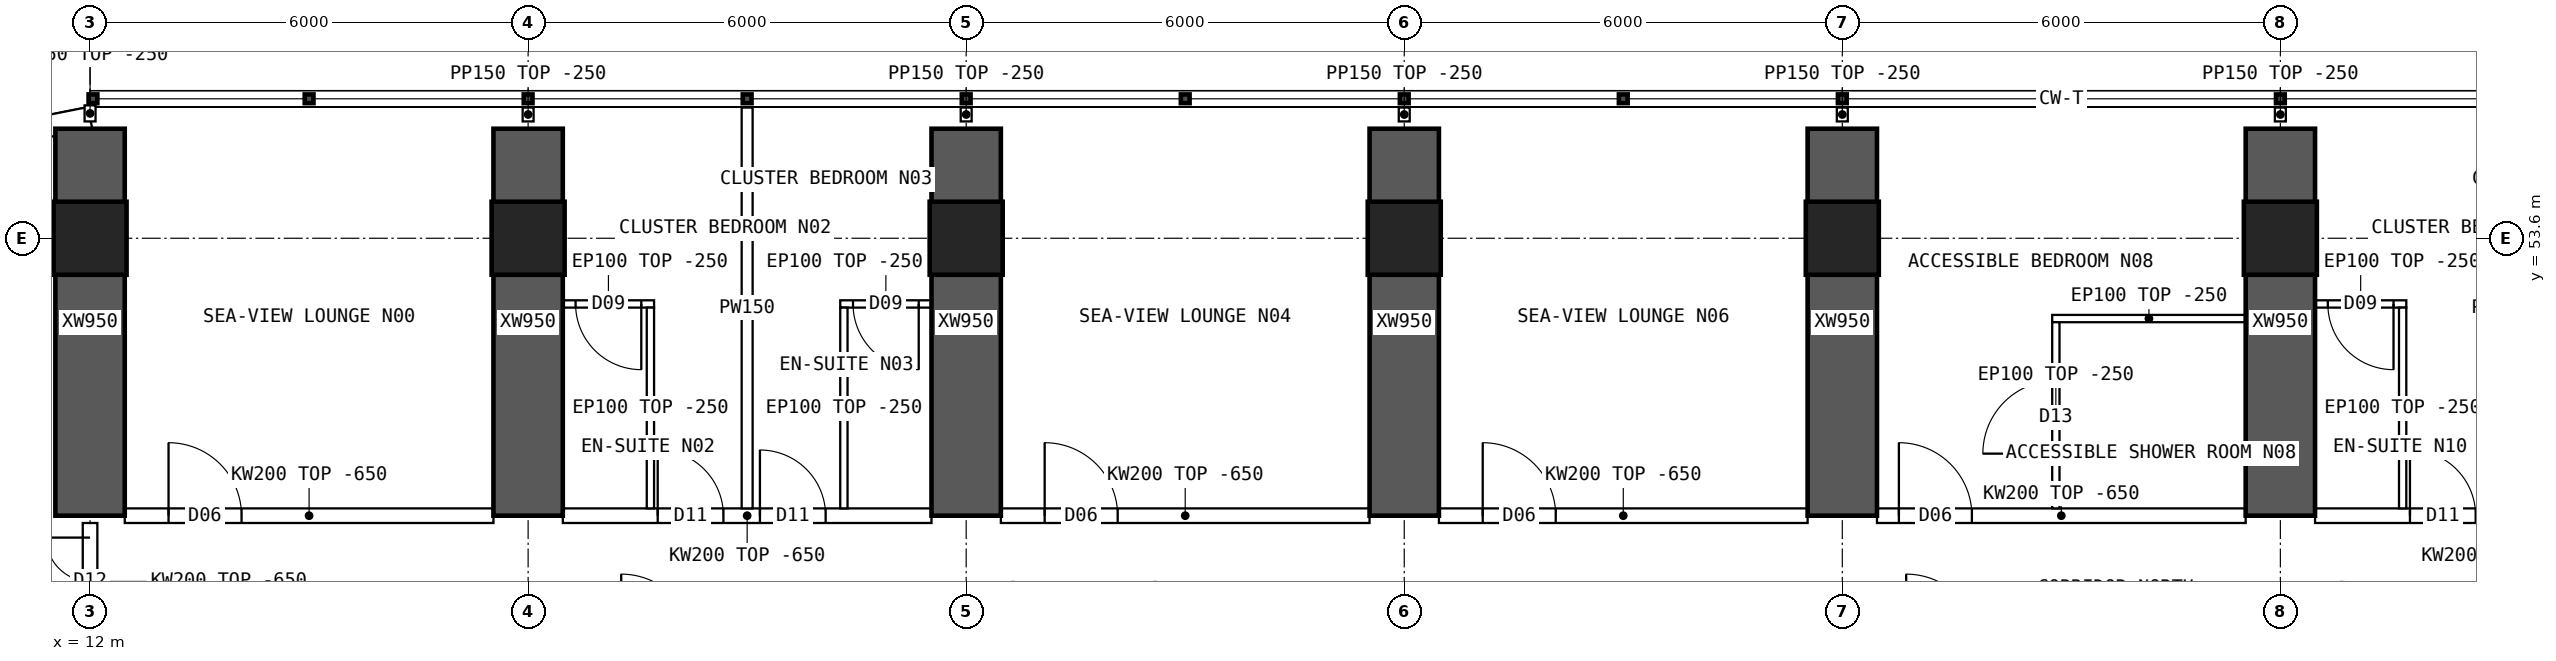
"""IFC4 building model, lengths in metres.
Left out: names, types, materials, properties, quantities, classifications, styles, units other than length and angle.
Written with IfcOpenShell. Run it as: python <this file> out.ifc"""

import sys

from ifc_helpers import new_model, si_unit, direction, frame, frame_2d, origin, origin_2d, place, context, subcontext, project, spatial, polyline, rectangle, hollow_rectangle, outline, extrude, element, fill, save


model = new_model("IFC4")
c1 = context("Model", 3, precision=1e-05, world=origin(), true_north=direction((0.0, 1.0)))
c2 = subcontext(c1, "Body", "Model", "MODEL_VIEW")
j1 = project(units=[si_unit("LENGTHUNIT", "METRE"), si_unit("PLANEANGLEUNIT", "RADIAN")], contexts=[c1])
p1 = place(None, origin())
s1 = spatial("IfcSite", under=j1, at=p1, CompositionType="ELEMENT")
p2 = place(p1, origin())
s2 = spatial("IfcBuilding", under=s1, at=p2, CompositionType="ELEMENT")
p3 = place(p2, frame((0.0, 0.0, 103.15)))
s3 = spatial("IfcBuildingStorey", under=s2, at=p3, CompositionType="ELEMENT", Elevation=103.15)
for number, where, z_axis, x_axis in (
    (1, (12.0, 53.6, 0.0), (0.0, 0.0, 1.0), (1.0, 0.0, 0.0)),
    (2, (18.0, 53.6, 0.0), (0.0, 0.0, 1.0), (1.0, 0.0, 0.0)),
    (3, (24.0, 53.6, 0.0), (0.0, 0.0, 1.0), (1.0, 0.0, 0.0)),
    (4, (30.0, 53.6, 0.0), (0.0, 0.0, 1.0), (1.0, 0.0, 0.0)),
    (5, (36.0, 53.6, 0.0), (0.0, 0.0, 1.0), (1.0, 0.0, 0.0)),
    (6, (42.0, 53.6, 0.0), (0.0, 0.0, 1.0), (1.0, 0.0, 0.0)),
):
    element("IfcColumn", number, at=place(p3, frame(where, z_axis=z_axis, x_axis=x_axis)), inside=s3, PredefinedType="COLUMN", context=c2, shape_type="SweptSolid", body=[
        extrude(hollow_rectangle(XDim=1.0, YDim=1.0, WallThickness=0.1, at=origin_2d()), origin(), (0.0, 0.0, 1.0), 3.75),
    ])
for number, where, z_axis, x_axis in (
    (7, (12.0, 49.8, 0.0), (0.0, 0.0, 1.0), (0.0, 1.0, 0.0)),
    (8, (18.0, 49.8, 0.0), (0.0, 0.0, 1.0), (0.0, 1.0, 0.0)),
    (9, (24.0, 49.8, 0.0), (0.0, 0.0, 1.0), (0.0, 1.0, 0.0)),
    (10, (30.0, 49.8, 0.0), (0.0, 0.0, 1.0), (0.0, 1.0, 0.0)),
    (11, (36.0, 49.8, 0.0), (0.0, 0.0, 1.0), (0.0, 1.0, 0.0)),
    (12, (42.0, 49.8, 0.0), (0.0, 0.0, 1.0), (0.0, 1.0, 0.0)),
):
    element("IfcWall", number, at=place(p3, frame(where, z_axis=z_axis, x_axis=x_axis)), inside=s3, PredefinedType="SHEAR", context=c2, shape_type="SweptSolid", body=[
        extrude(rectangle(XDim=5.3, YDim=0.95, at=frame_2d((2.65, 0.0))), origin(), (0.0, 0.0, 1.0), 3.75),
    ])
p4 = place(p3, frame((12.0, 55.25, 0.0), z_axis=(0.0, 0.0, 1.0), x_axis=(-0.980787251524, -0.195080412259, 0.0)))
e13 = element("IfcWall", 13, at=p4, inside=s3, PredefinedType="SOLIDWALL", context=c2, shape_type="SweptSolid", body=[
    extrude(outline(polyline([(-0.03, -0.15), (3.249, -0.15), (3.189, 0.15), (0.03, 0.15), (-0.03, -0.15)])), origin(), (0.0, 0.0, 1.0), 3.5),
])
p5 = place(p4, frame((0.909, 0.0, 0.9)))
e14 = element("IfcOpeningElement", 14, at=p5, cuts=e13, PredefinedType="OPENING", context=c2, shape_type="SweptSolid", body=[
    extrude(rectangle(XDim=1.4, YDim=1.8, at=frame_2d((0.7, 0.9))), frame((0.0, 0.16, 0.0), z_axis=(0.0, -1.0, 0.0), x_axis=(1.0, 0.0, 0.0)), (0.0, 0.0, 1.0), 0.32),
])
p6 = place(p3, frame((12.475, 49.8, 0.0), z_axis=(0.0, 0.0, 1.0), x_axis=(1.0, 0.0, 0.0)))
e15 = element("IfcWall", 15, at=p6, inside=s3, PredefinedType="SOLIDWALL", context=c2, shape_type="SweptSolid", body=[
    extrude(outline(polyline([(0.0, 0.0), (5.05, 0.0), (5.05, 3.1), (0.0, 3.1), (0.0, 0.0)])), frame((0.0, 0.1, 0.0), z_axis=(0.0, -1.0, 0.0), x_axis=(1.0, 0.0, 0.0)), (0.0, 0.0, 1.0), 0.2),
])
p7 = place(p6, frame((0.6, 0.0, 0.0)))
e16 = element("IfcOpeningElement", 16, at=p7, cuts=e15, PredefinedType="OPENING", context=c2, shape_type="SweptSolid", body=[
    extrude(rectangle(XDim=1.0, YDim=2.1, at=frame_2d((0.5, 1.05))), frame((0.0, 0.11, 0.0), z_axis=(0.0, -1.0, 0.0), x_axis=(1.0, 0.0, 0.0)), (0.0, 0.0, 1.0), 0.22),
])
p8 = place(p3, frame((18.475, 49.8, 0.0), z_axis=(0.0, 0.0, 1.0), x_axis=(1.0, 0.0, 0.0)))
e17 = element("IfcWall", 17, at=p8, inside=s3, PredefinedType="SOLIDWALL", context=c2, shape_type="SweptSolid", body=[
    extrude(outline(polyline([(0.0, 0.0), (5.05, 0.0), (5.05, 3.1), (0.0, 3.1), (0.0, 0.0)])), frame((0.0, 0.1, 0.0), z_axis=(0.0, -1.0, 0.0), x_axis=(1.0, 0.0, 0.0)), (0.0, 0.0, 1.0), 0.2),
])
p9 = place(p8, frame((1.3, 0.0, 0.0)))
e18 = element("IfcOpeningElement", 18, at=p9, cuts=e17, PredefinedType="OPENING", context=c2, shape_type="SweptSolid", body=[
    extrude(rectangle(XDim=0.9, YDim=2.1, at=frame_2d((0.45, 1.05))), frame((0.0, 0.11, 0.0), z_axis=(0.0, -1.0, 0.0), x_axis=(1.0, 0.0, 0.0)), (0.0, 0.0, 1.0), 0.22),
])
p10 = place(p8, frame((2.7, 0.0, 0.0)))
e19 = element("IfcOpeningElement", 19, at=p10, cuts=e17, PredefinedType="OPENING", context=c2, shape_type="SweptSolid", body=[
    extrude(rectangle(XDim=0.9, YDim=2.1, at=frame_2d((0.45, 1.05))), frame((0.0, 0.11, 0.0), z_axis=(0.0, -1.0, 0.0), x_axis=(1.0, 0.0, 0.0)), (0.0, 0.0, 1.0), 0.22),
])
p11 = place(p3, frame((24.475, 49.8, 0.0), z_axis=(0.0, 0.0, 1.0), x_axis=(1.0, 0.0, 0.0)))
e20 = element("IfcWall", 20, at=p11, inside=s3, PredefinedType="SOLIDWALL", context=c2, shape_type="SweptSolid", body=[
    extrude(outline(polyline([(0.0, 0.0), (5.05, 0.0), (5.05, 3.1), (0.0, 3.1), (0.0, 0.0)])), frame((0.0, 0.1, 0.0), z_axis=(0.0, -1.0, 0.0), x_axis=(1.0, 0.0, 0.0)), (0.0, 0.0, 1.0), 0.2),
])
p12 = place(p11, frame((0.6, 0.0, 0.0)))
e21 = element("IfcOpeningElement", 21, at=p12, cuts=e20, PredefinedType="OPENING", context=c2, shape_type="SweptSolid", body=[
    extrude(rectangle(XDim=1.0, YDim=2.1, at=frame_2d((0.5, 1.05))), frame((0.0, 0.11, 0.0), z_axis=(0.0, -1.0, 0.0), x_axis=(1.0, 0.0, 0.0)), (0.0, 0.0, 1.0), 0.22),
])
p13 = place(p3, frame((30.475, 49.8, 0.0), z_axis=(0.0, 0.0, 1.0), x_axis=(1.0, 0.0, 0.0)))
e22 = element("IfcWall", 22, at=p13, inside=s3, PredefinedType="SOLIDWALL", context=c2, shape_type="SweptSolid", body=[
    extrude(outline(polyline([(0.0, 0.0), (5.05, 0.0), (5.05, 3.1), (0.0, 3.1), (0.0, 0.0)])), frame((0.0, 0.1, 0.0), z_axis=(0.0, -1.0, 0.0), x_axis=(1.0, 0.0, 0.0)), (0.0, 0.0, 1.0), 0.2),
])
p14 = place(p13, frame((0.6, 0.0, 0.0)))
e23 = element("IfcOpeningElement", 23, at=p14, cuts=e22, PredefinedType="OPENING", context=c2, shape_type="SweptSolid", body=[
    extrude(rectangle(XDim=1.0, YDim=2.1, at=frame_2d((0.5, 1.05))), frame((0.0, 0.11, 0.0), z_axis=(0.0, -1.0, 0.0), x_axis=(1.0, 0.0, 0.0)), (0.0, 0.0, 1.0), 0.22),
])
p15 = place(p3, frame((36.475, 49.8, 0.0), z_axis=(0.0, 0.0, 1.0), x_axis=(1.0, 0.0, 0.0)))
e24 = element("IfcWall", 24, at=p15, inside=s3, PredefinedType="SOLIDWALL", context=c2, shape_type="SweptSolid", body=[
    extrude(outline(polyline([(0.0, 0.0), (5.05, 0.0), (5.05, 3.1), (0.0, 3.1), (0.0, 0.0)])), frame((0.0, 0.1, 0.0), z_axis=(0.0, -1.0, 0.0), x_axis=(1.0, 0.0, 0.0)), (0.0, 0.0, 1.0), 0.2),
])
p16 = place(p15, frame((0.3, 0.0, 0.0)))
e25 = element("IfcOpeningElement", 25, at=p16, cuts=e24, PredefinedType="OPENING", context=c2, shape_type="SweptSolid", body=[
    extrude(rectangle(XDim=1.0, YDim=2.1, at=frame_2d((0.5, 1.05))), frame((0.0, 0.11, 0.0), z_axis=(0.0, -1.0, 0.0), x_axis=(1.0, 0.0, 0.0)), (0.0, 0.0, 1.0), 0.22),
])
p17 = place(p3, frame((42.475, 49.8, 0.0), z_axis=(0.0, 0.0, 1.0), x_axis=(1.0, 0.0, 0.0)))
e26 = element("IfcWall", 26, at=p17, inside=s3, PredefinedType="SOLIDWALL", context=c2, shape_type="SweptSolid", body=[
    extrude(outline(polyline([(0.0, 0.0), (5.05, 0.0), (5.05, 3.1), (0.0, 3.1), (0.0, 0.0)])), frame((0.0, 0.1, 0.0), z_axis=(0.0, -1.0, 0.0), x_axis=(1.0, 0.0, 0.0)), (0.0, 0.0, 1.0), 0.2),
])
p18 = place(p17, frame((1.3, 0.0, 0.0)))
e27 = element("IfcOpeningElement", 27, at=p18, cuts=e26, PredefinedType="OPENING", context=c2, shape_type="SweptSolid", body=[
    extrude(rectangle(XDim=0.9, YDim=2.1, at=frame_2d((0.45, 1.05))), frame((0.0, 0.11, 0.0), z_axis=(0.0, -1.0, 0.0), x_axis=(1.0, 0.0, 0.0)), (0.0, 0.0, 1.0), 0.22),
])
p19 = place(p17, frame((2.7, 0.0, 0.0)))
e28 = element("IfcOpeningElement", 28, at=p19, cuts=e26, PredefinedType="OPENING", context=c2, shape_type="SweptSolid", body=[
    extrude(rectangle(XDim=0.9, YDim=2.1, at=frame_2d((0.45, 1.05))), frame((0.0, 0.11, 0.0), z_axis=(0.0, -1.0, 0.0), x_axis=(1.0, 0.0, 0.0)), (0.0, 0.0, 1.0), 0.22),
])
p20 = place(p3, frame((21.0, 55.39, 0.0), z_axis=(0.0, 0.0, 1.0), x_axis=(0.0, -1.0, 0.0)))
e29 = element("IfcWall", 29, at=p20, inside=s3, PredefinedType="PARTITIONING", context=c2, shape_type="SweptSolid", body=[
    extrude(outline(polyline([(0.0, 0.0), (5.49, 0.0), (5.49, 3.1), (5.442, 3.1), (5.44, 3.5), (1.992, 3.5), (1.99, 3.1), (1.592, 3.1), (1.59, 3.5), (0.0, 3.5), (0.0, 0.0)])), frame((0.0, 0.075, 0.0), z_axis=(0.0, -1.0, 0.0), x_axis=(1.0, 0.0, 0.0)), (0.0, 0.0, 1.0), 0.15),
])
p21 = place(p3, frame((18.475, 52.7, 0.0), z_axis=(0.0, 0.0, 1.0), x_axis=(1.0, 0.0, 0.0)))
e30 = element("IfcWall", 30, at=p21, inside=s3, PredefinedType="PARTITIONING", context=c2, shape_type="SweptSolid", body=[
    extrude(rectangle(XDim=1.25, YDim=0.1, at=frame_2d((0.625, 0.0))), origin(), (0.0, 0.0, 1.0), 3.5),
])
p22 = place(p21, frame((0.175, 0.0, 0.0)))
e31 = element("IfcOpeningElement", 31, at=p22, cuts=e30, PredefinedType="OPENING", context=c2, shape_type="SweptSolid", body=[
    extrude(rectangle(XDim=0.9, YDim=2.1, at=frame_2d((0.45, 1.05))), frame((0.0, 0.06, 0.0), z_axis=(0.0, -1.0, 0.0), x_axis=(1.0, 0.0, 0.0)), (0.0, 0.0, 1.0), 0.12),
])
p23 = place(p3, frame((19.675, 52.65, 0.0), z_axis=(0.0, 0.0, 1.0), x_axis=(0.0, -1.0, 0.0)))
e32 = element("IfcWall", 32, at=p23, inside=s3, PredefinedType="PARTITIONING", context=c2, shape_type="SweptSolid", body=[
    extrude(outline(polyline([(0.0, 0.0), (2.75, 0.0), (2.75, 3.1), (2.702, 3.1), (2.7, 3.5), (0.0, 3.5), (0.0, 0.0)])), frame((0.0, 0.05, 0.0), z_axis=(0.0, -1.0, 0.0), x_axis=(1.0, 0.0, 0.0)), (0.0, 0.0, 1.0), 0.1),
])
p24 = place(p3, frame((22.275, 52.7, 0.0), z_axis=(0.0, 0.0, 1.0), x_axis=(1.0, 0.0, 0.0)))
e33 = element("IfcWall", 33, at=p24, inside=s3, PredefinedType="PARTITIONING", context=c2, shape_type="SweptSolid", body=[
    extrude(rectangle(XDim=1.25, YDim=0.1, at=frame_2d((0.625, 0.0))), origin(), (0.0, 0.0, 1.0), 3.5),
])
p25 = place(p24, frame((0.175, 0.0, 0.0)))
e34 = element("IfcOpeningElement", 34, at=p25, cuts=e33, PredefinedType="OPENING", context=c2, shape_type="SweptSolid", body=[
    extrude(rectangle(XDim=0.9, YDim=2.1, at=frame_2d((0.45, 1.05))), frame((0.0, 0.06, 0.0), z_axis=(0.0, -1.0, 0.0), x_axis=(1.0, 0.0, 0.0)), (0.0, 0.0, 1.0), 0.12),
])
p26 = place(p3, frame((22.325, 52.65, 0.0), z_axis=(0.0, 0.0, 1.0), x_axis=(0.0, -1.0, 0.0)))
e35 = element("IfcWall", 35, at=p26, inside=s3, PredefinedType="PARTITIONING", context=c2, shape_type="SweptSolid", body=[
    extrude(outline(polyline([(0.0, 0.0), (2.75, 0.0), (2.75, 3.1), (2.702, 3.1), (2.7, 3.5), (0.0, 3.5), (0.0, 0.0)])), frame((0.0, 0.05, 0.0), z_axis=(0.0, -1.0, 0.0), x_axis=(1.0, 0.0, 0.0)), (0.0, 0.0, 1.0), 0.1),
])
p27 = place(p3, frame((38.875, 52.5, 0.0), z_axis=(0.0, 0.0, 1.0), x_axis=(1.0, 0.0, 0.0)))
e36 = element("IfcWall", 36, at=p27, inside=s3, PredefinedType="PARTITIONING", context=c2, shape_type="SweptSolid", body=[
    extrude(rectangle(XDim=2.65, YDim=0.1, at=frame_2d((1.325, 0.0))), origin(), (0.0, 0.0, 1.0), 3.5),
])
p28 = place(p3, frame((38.925, 52.45, 0.0), z_axis=(0.0, 0.0, 1.0), x_axis=(0.0, -1.0, 0.0)))
e37 = element("IfcWall", 37, at=p28, inside=s3, PredefinedType="PARTITIONING", context=c2, shape_type="SweptSolid", body=[
    extrude(outline(polyline([(0.0, 0.0), (2.55, 0.0), (2.55, 3.1), (2.502, 3.1), (2.5, 3.5), (0.0, 3.5), (0.0, 0.0)])), frame((0.0, 0.05, 0.0), z_axis=(0.0, -1.0, 0.0), x_axis=(1.0, 0.0, 0.0)), (0.0, 0.0, 1.0), 0.1),
])
p29 = place(p28, frame((0.8, 0.0, 0.0)))
e38 = element("IfcOpeningElement", 38, at=p29, cuts=e37, PredefinedType="OPENING", context=c2, shape_type="SweptSolid", body=[
    extrude(rectangle(XDim=1.0, YDim=2.1, at=frame_2d((0.5, 1.05))), frame((0.0, 0.06, 0.0), z_axis=(0.0, -1.0, 0.0), x_axis=(1.0, 0.0, 0.0)), (0.0, 0.0, 1.0), 0.12),
])
p30 = place(p3, frame((42.475, 52.7, 0.0), z_axis=(0.0, 0.0, 1.0), x_axis=(1.0, 0.0, 0.0)))
e39 = element("IfcWall", 39, at=p30, inside=s3, PredefinedType="PARTITIONING", context=c2, shape_type="SweptSolid", body=[
    extrude(rectangle(XDim=1.25, YDim=0.1, at=frame_2d((0.625, 0.0))), origin(), (0.0, 0.0, 1.0), 3.5),
])
p31 = place(p30, frame((0.175, 0.0, 0.0)))
e40 = element("IfcOpeningElement", 40, at=p31, cuts=e39, PredefinedType="OPENING", context=c2, shape_type="SweptSolid", body=[
    extrude(rectangle(XDim=0.9, YDim=2.1, at=frame_2d((0.45, 1.05))), frame((0.0, 0.06, 0.0), z_axis=(0.0, -1.0, 0.0), x_axis=(1.0, 0.0, 0.0)), (0.0, 0.0, 1.0), 0.12),
])
p32 = place(p3, frame((43.675, 52.65, 0.0), z_axis=(0.0, 0.0, 1.0), x_axis=(0.0, -1.0, 0.0)))
e41 = element("IfcWall", 41, at=p32, inside=s3, PredefinedType="PARTITIONING", context=c2, shape_type="SweptSolid", body=[
    extrude(outline(polyline([(0.0, 0.0), (2.75, 0.0), (2.75, 3.1), (2.702, 3.1), (2.7, 3.5), (0.0, 3.5), (0.0, 0.0)])), frame((0.0, 0.05, 0.0), z_axis=(0.0, -1.0, 0.0), x_axis=(1.0, 0.0, 0.0)), (0.0, 0.0, 1.0), 0.1),
])
p33 = place(p3, frame((12.0, 48.1, 0.0), z_axis=(0.0, 0.0, 1.0), x_axis=(0.0, 1.0, 0.0)))
e42 = element("IfcWall", 42, at=p33, inside=s3, PredefinedType="SOLIDWALL", context=c2, shape_type="SweptSolid", body=[
    extrude(outline(polyline([(0.0, 0.0), (1.6, 0.0), (1.6, 3.1), (0.0, 3.1), (0.0, 0.0)])), frame((0.0, 0.1, 0.0), z_axis=(0.0, -1.0, 0.0), x_axis=(1.0, 0.0, 0.0)), (0.0, 0.0, 1.0), 0.2),
])
p34 = place(p33, frame((0.2, 0.0, 0.0)))
e43 = element("IfcOpeningElement", 43, at=p34, cuts=e42, PredefinedType="OPENING", context=c2, shape_type="SweptSolid", body=[
    extrude(rectangle(XDim=1.2, YDim=2.1, at=frame_2d((0.6, 1.05))), frame((0.0, 0.11, 0.0), z_axis=(0.0, -1.0, 0.0), x_axis=(1.0, 0.0, 0.0)), (0.0, 0.0, 1.0), 0.22),
])
p35 = place(p3, frame((12.0, 55.2, 0.0), z_axis=(0.0, 0.0, 1.0), x_axis=(0.0, 1.0, 0.0)))
e44 = element("IfcWall", 44, at=p35, inside=s3, PredefinedType="PARTITIONING", context=c2, shape_type="SweptSolid", body=[
    extrude(rectangle(XDim=0.22, YDim=0.15, at=frame_2d((0.11, 0.0))), origin(), (0.0, 0.0, 1.0), 3.5),
])
for number, where, z_axis, x_axis in (
    (45, (18.0, 55.2, 0.0), (0.0, 0.0, 1.0), (0.0, 1.0, 0.0)),
    (46, (24.0, 55.2, 0.0), (0.0, 0.0, 1.0), (0.0, 1.0, 0.0)),
    (47, (30.0, 55.2, 0.0), (0.0, 0.0, 1.0), (0.0, 1.0, 0.0)),
    (48, (36.0, 55.2, 0.0), (0.0, 0.0, 1.0), (0.0, 1.0, 0.0)),
    (49, (42.0, 55.2, 0.0), (0.0, 0.0, 1.0), (0.0, 1.0, 0.0)),
):
    element("IfcWall", number, at=place(p3, frame(where, z_axis=z_axis, x_axis=x_axis)), inside=s3, PredefinedType="PARTITIONING", context=c2, shape_type="SweptSolid", body=[
        extrude(rectangle(XDim=0.19, YDim=0.15, at=frame_2d((0.095, 0.0))), origin(), (0.0, 0.0, 1.0), 3.5),
    ])
p36 = place(p7, origin())
e50 = element("IfcDoor", 50, at=p36, inside=s3, OperationType="SINGLE_SWING_LEFT", PredefinedType="DOOR", context=c2, shape_type="SweptSolid", body=[
    extrude(rectangle(XDim=1.0, YDim=2.1, at=frame_2d((0.5, 1.05))), frame((0.0, 0.025, 0.0), z_axis=(0.0, -1.0, 0.0), x_axis=(1.0, 0.0, 0.0)), (0.0, 0.0, 1.0), 0.05),
])
fill(e16, e50)
p37 = place(p22, origin())
e51 = element("IfcDoor", 51, at=p37, inside=s3, OperationType="SINGLE_SWING_RIGHT", PredefinedType="DOOR", context=c2, shape_type="SweptSolid", body=[
    extrude(rectangle(XDim=0.9, YDim=2.1, at=frame_2d((0.45, 1.05))), frame((0.0, 0.025, 0.0), z_axis=(0.0, -1.0, 0.0), x_axis=(1.0, 0.0, 0.0)), (0.0, 0.0, 1.0), 0.05),
])
fill(e31, e51)
p38 = place(p9, origin())
e52 = element("IfcDoor", 52, at=p38, inside=s3, OperationType="SINGLE_SWING_LEFT", PredefinedType="DOOR", context=c2, shape_type="SweptSolid", body=[
    extrude(rectangle(XDim=0.9, YDim=2.1, at=frame_2d((0.45, 1.05))), frame((0.0, 0.025, 0.0), z_axis=(0.0, -1.0, 0.0), x_axis=(1.0, 0.0, 0.0)), (0.0, 0.0, 1.0), 0.05),
])
fill(e18, e52)
p39 = place(p25, origin())
e53 = element("IfcDoor", 53, at=p39, inside=s3, OperationType="SINGLE_SWING_RIGHT", PredefinedType="DOOR", context=c2, shape_type="SweptSolid", body=[
    extrude(rectangle(XDim=0.9, YDim=2.1, at=frame_2d((0.45, 1.05))), frame((0.0, 0.025, 0.0), z_axis=(0.0, -1.0, 0.0), x_axis=(1.0, 0.0, 0.0)), (0.0, 0.0, 1.0), 0.05),
])
fill(e34, e53)
p40 = place(p10, origin())
e54 = element("IfcDoor", 54, at=p40, inside=s3, OperationType="SINGLE_SWING_LEFT", PredefinedType="DOOR", context=c2, shape_type="SweptSolid", body=[
    extrude(rectangle(XDim=0.9, YDim=2.1, at=frame_2d((0.45, 1.05))), frame((0.0, 0.025, 0.0), z_axis=(0.0, -1.0, 0.0), x_axis=(1.0, 0.0, 0.0)), (0.0, 0.0, 1.0), 0.05),
])
fill(e19, e54)
p41 = place(p12, origin())
e55 = element("IfcDoor", 55, at=p41, inside=s3, OperationType="SINGLE_SWING_LEFT", PredefinedType="DOOR", context=c2, shape_type="SweptSolid", body=[
    extrude(rectangle(XDim=1.0, YDim=2.1, at=frame_2d((0.5, 1.05))), frame((0.0, 0.025, 0.0), z_axis=(0.0, -1.0, 0.0), x_axis=(1.0, 0.0, 0.0)), (0.0, 0.0, 1.0), 0.05),
])
fill(e21, e55)
p42 = place(p14, origin())
e56 = element("IfcDoor", 56, at=p42, inside=s3, OperationType="SINGLE_SWING_LEFT", PredefinedType="DOOR", context=c2, shape_type="SweptSolid", body=[
    extrude(rectangle(XDim=1.0, YDim=2.1, at=frame_2d((0.5, 1.05))), frame((0.0, 0.025, 0.0), z_axis=(0.0, -1.0, 0.0), x_axis=(1.0, 0.0, 0.0)), (0.0, 0.0, 1.0), 0.05),
])
fill(e23, e56)
p43 = place(p29, origin())
e57 = element("IfcDoor", 57, at=p43, inside=s3, OperationType="SINGLE_SWING_RIGHT", PredefinedType="DOOR", context=c2, shape_type="SweptSolid", body=[
    extrude(rectangle(XDim=1.0, YDim=2.1, at=frame_2d((0.5, 1.05))), frame((0.0, 0.025, 0.0), z_axis=(0.0, -1.0, 0.0), x_axis=(1.0, 0.0, 0.0)), (0.0, 0.0, 1.0), 0.05),
])
fill(e38, e57)
p44 = place(p16, origin())
e58 = element("IfcDoor", 58, at=p44, inside=s3, OperationType="SINGLE_SWING_LEFT", PredefinedType="DOOR", context=c2, shape_type="SweptSolid", body=[
    extrude(rectangle(XDim=1.0, YDim=2.1, at=frame_2d((0.5, 1.05))), frame((0.0, 0.025, 0.0), z_axis=(0.0, -1.0, 0.0), x_axis=(1.0, 0.0, 0.0)), (0.0, 0.0, 1.0), 0.05),
])
fill(e25, e58)
p45 = place(p31, origin())
e59 = element("IfcDoor", 59, at=p45, inside=s3, OperationType="SINGLE_SWING_RIGHT", PredefinedType="DOOR", context=c2, shape_type="SweptSolid", body=[
    extrude(rectangle(XDim=0.9, YDim=2.1, at=frame_2d((0.45, 1.05))), frame((0.0, 0.025, 0.0), z_axis=(0.0, -1.0, 0.0), x_axis=(1.0, 0.0, 0.0)), (0.0, 0.0, 1.0), 0.05),
])
fill(e40, e59)
p46 = place(p18, origin())
e60 = element("IfcDoor", 60, at=p46, inside=s3, OperationType="SINGLE_SWING_LEFT", PredefinedType="DOOR", context=c2, shape_type="SweptSolid", body=[
    extrude(rectangle(XDim=0.9, YDim=2.1, at=frame_2d((0.45, 1.05))), frame((0.0, 0.025, 0.0), z_axis=(0.0, -1.0, 0.0), x_axis=(1.0, 0.0, 0.0)), (0.0, 0.0, 1.0), 0.05),
])
fill(e27, e60)
p47 = place(p34, origin())
e61 = element("IfcDoor", 61, at=p47, inside=s3, OperationType="DOUBLE_DOOR_SINGLE_SWING", PredefinedType="DOOR", context=c2, shape_type="SweptSolid", body=[
    extrude(rectangle(XDim=1.2, YDim=2.1, at=frame_2d((0.6, 1.05))), frame((0.0, 0.025, 0.0), z_axis=(0.0, -1.0, 0.0), x_axis=(1.0, 0.0, 0.0)), (0.0, 0.0, 1.0), 0.05),
])
fill(e43, e61)
save(model, sys.argv[1])
